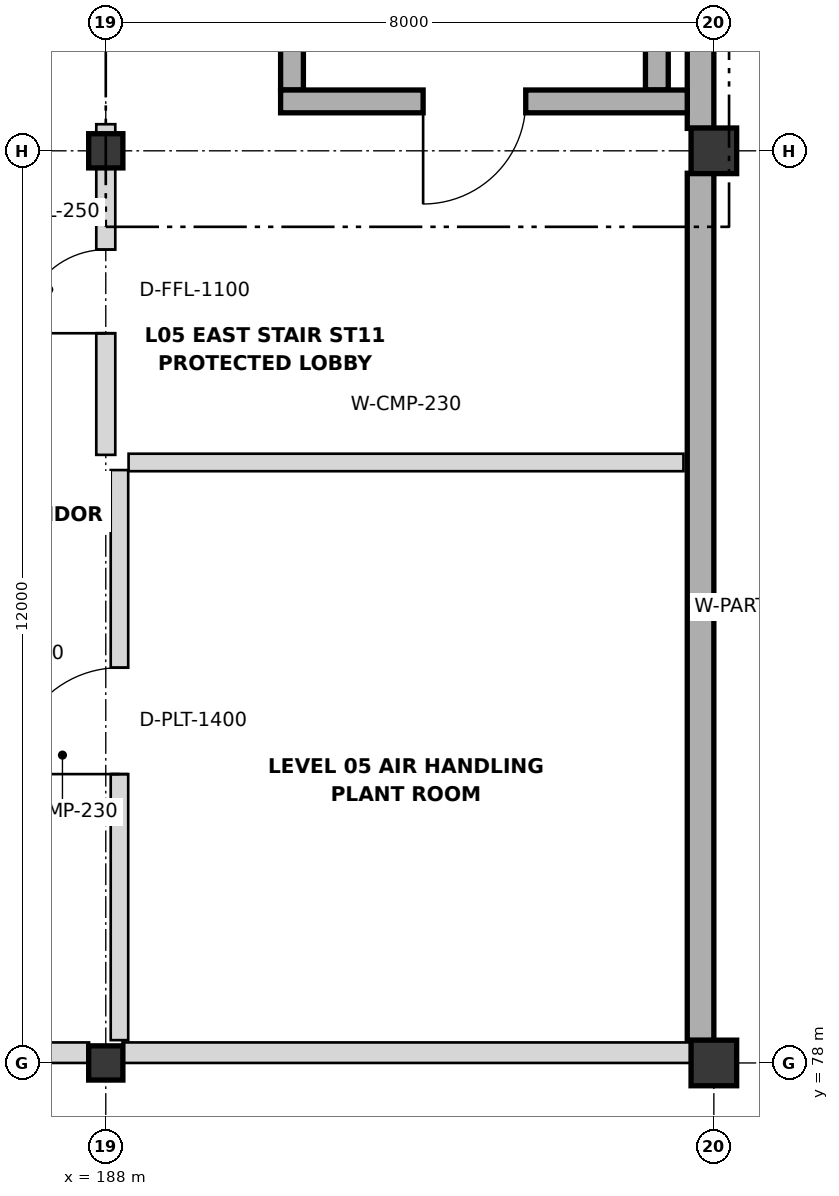
"""IFC4 building model, lengths in metres.
Left out: names, types, materials, properties, quantities, classifications, styles, units other than length and angle.
Written with IfcOpenShell. Run it as: python <this file> out.ifc"""

import sys

from ifc_helpers import new_model, si_unit, direction, frame, frame_2d, origin, origin_2d, place, context, subcontext, project, spatial, rectangle, extrude, element, fill, save


model = new_model("IFC4")
c1 = context("Model", 3, precision=1e-05, world=origin(), true_north=direction((0.0, 1.0)))
c2 = subcontext(c1, "Body", "Model", "MODEL_VIEW")
j1 = project(units=[si_unit("LENGTHUNIT", "METRE"), si_unit("PLANEANGLEUNIT", "RADIAN")], contexts=[c1])
p1 = place(None, origin())
s1 = spatial("IfcSite", under=j1, at=p1, CompositionType="ELEMENT")
p2 = place(p1, origin())
s2 = spatial("IfcBuilding", under=s1, at=p2, CompositionType="ELEMENT")
p3 = place(p2, frame((0.0, 0.0, 22.8)))
s3 = spatial("IfcBuildingStorey", under=s2, at=p3, CompositionType="ELEMENT", Elevation=22.8)
for number, where, z_axis, x_axis in (
    (1, (188.0, 78.0, 0.0), (0.0, 0.0, 1.0), (1.0, 0.0, 0.0)),
    (2, (188.0, 90.0, 0.0), (0.0, 0.0, 1.0), (1.0, 0.0, 0.0)),
):
    element("IfcColumn", number, at=place(p3, frame(where, z_axis=z_axis, x_axis=x_axis)), inside=s3, PredefinedType="COLUMN", context=c2, shape_type="SweptSolid", body=[
        extrude(rectangle(XDim=0.45, YDim=0.45, at=origin_2d()), origin(), (0.0, 0.0, 1.0), 4.2),
    ])
for number, where, z_axis, x_axis in (
    (3, (196.0, 78.0, 0.0), (0.0, 0.0, 1.0), (1.0, 0.0, 0.0)),
    (4, (196.0, 90.0, 0.0), (0.0, 0.0, 1.0), (1.0, 0.0, 0.0)),
):
    element("IfcColumn", number, at=place(p3, frame(where, z_axis=z_axis, x_axis=x_axis)), inside=s3, PredefinedType="COLUMN", context=c2, shape_type="SweptSolid", body=[
        extrude(rectangle(XDim=0.6, YDim=0.6, at=origin_2d()), origin(), (0.0, 0.0, 1.0), 4.2),
    ])
for number, where, z_axis, x_axis in (
    (5, (195.825, 89.705, 0.0), (0.0, 0.0, 1.0), (0.0, -1.0, 0.0)),
    (6, (195.825, 101.705, 0.0), (0.0, 0.0, 1.0), (0.0, -1.0, 0.0)),
):
    element("IfcWall", number, at=place(p3, frame(where, z_axis=z_axis, x_axis=x_axis)), inside=s3, PredefinedType="SOLIDWALL", context=c2, shape_type="SweptSolid", body=[
        extrude(rectangle(XDim=11.41, YDim=0.35, at=frame_2d((5.705, 0.0))), origin(), (0.0, 0.0, 1.0), 4.2),
    ])
p4 = place(p3, frame((187.78, 78.135, 0.0), z_axis=(0.0, 0.0, 1.0), x_axis=(-1.0, 0.0, 0.0)))
e7 = element("IfcWall", 7, at=p4, inside=s3, PredefinedType="SOLIDWALL", context=c2, shape_type="SweptSolid", body=[
    extrude(rectangle(XDim=9.56, YDim=0.27, at=frame_2d((4.78, 0.0))), origin(), (0.0, 0.0, 1.0), 3.188),
])
p5 = place(p4, frame((5.48, 0.0, 1.0)))
e8 = element("IfcOpeningElement", 8, at=p5, cuts=e7, PredefinedType="OPENING", context=c2, shape_type="SweptSolid", body=[
    extrude(rectangle(XDim=2.1, YDim=1.15, at=frame_2d((1.05, 0.575))), frame((0.0, 0.145, 0.0), z_axis=(0.0, -1.0, 0.0), x_axis=(1.0, 0.0, 0.0)), (0.0, 0.0, 1.0), 0.29),
])
p6 = place(p3, frame((195.705, 78.135, 0.0), z_axis=(0.0, 0.0, 1.0), x_axis=(-1.0, 0.0, 0.0)))
e9 = element("IfcWall", 9, at=p6, inside=s3, PredefinedType="SOLIDWALL", context=c2, shape_type="SweptSolid", body=[
    extrude(rectangle(XDim=7.485, YDim=0.27, at=frame_2d((3.743, 0.0))), origin(), (0.0, 0.0, 1.0), 3.188),
])
for number, where, z_axis, x_axis in (
    (10, (190.45, 90.8, 0.0), (0.0, 0.0, 1.0), (0.0, 1.0, 0.0)),
    (11, (195.25, 99.4, 0.0), (0.0, 0.0, 1.0), (0.0, -1.0, 0.0)),
):
    element("IfcWall", number, at=place(p3, frame(where, z_axis=z_axis, x_axis=x_axis)), inside=s3, PredefinedType="SHEAR", context=c2, shape_type="SweptSolid", body=[
        extrude(rectangle(XDim=8.6, YDim=0.3, at=frame_2d((4.3, 0.0))), origin(), (0.0, 0.0, 1.0), 3.95),
    ])
p7 = place(p3, frame((195.65, 90.65, 0.0), z_axis=(0.0, 0.0, 1.0), x_axis=(-1.0, 0.0, 0.0)))
e12 = element("IfcWall", 12, at=p7, inside=s3, PredefinedType="SHEAR", context=c2, shape_type="SweptSolid", body=[
    extrude(rectangle(XDim=5.35, YDim=0.3, at=frame_2d((2.675, 0.0))), origin(), (0.0, 0.0, 1.0), 3.95),
])
p8 = place(p7, frame((2.125, 0.0, 0.0)))
e13 = element("IfcOpeningElement", 13, at=p8, cuts=e12, PredefinedType="OPENING", context=c2, shape_type="SweptSolid", body=[
    extrude(rectangle(XDim=1.35, YDim=2.15, at=frame_2d((0.675, 1.075))), frame((0.0, 0.16, 0.0), z_axis=(0.0, -1.0, 0.0), x_axis=(1.0, 0.0, 0.0)), (0.0, 0.0, 1.0), 0.32),
])
p9 = place(p3, frame((188.0, 86.0, 0.0), z_axis=(0.0, 0.0, 1.0), x_axis=(0.0, 1.0, 0.0)))
e14 = element("IfcWall", 14, at=p9, inside=s3, PredefinedType="PARTITIONING", context=c2, shape_type="SweptSolid", body=[
    extrude(rectangle(XDim=4.35, YDim=0.25, at=frame_2d((2.175, 0.0))), origin(), (0.0, 0.0, 1.0), 3.188),
])
p10 = place(p9, frame((1.6, 0.0, 0.0)))
e15 = element("IfcOpeningElement", 15, at=p10, cuts=e14, PredefinedType="OPENING", context=c2, shape_type="SweptSolid", body=[
    extrude(rectangle(XDim=1.1, YDim=2.15, at=frame_2d((0.55, 1.075))), frame((0.0, 0.135, 0.0), z_axis=(0.0, -1.0, 0.0), x_axis=(1.0, 0.0, 0.0)), (0.0, 0.0, 1.0), 0.27),
])
p11 = place(p3, frame((188.18, 78.3, 0.0), z_axis=(0.0, 0.0, 1.0), x_axis=(0.0, 1.0, 0.0)))
e16 = element("IfcWall", 16, at=p11, inside=s3, PredefinedType="PARTITIONING", context=c2, shape_type="SweptSolid", body=[
    extrude(rectangle(XDim=7.5, YDim=0.23, at=frame_2d((3.75, 0.0))), origin(), (0.0, 0.0, 1.0), 3.188),
])
p12 = place(p11, frame((3.5, 0.0, 0.0)))
e17 = element("IfcOpeningElement", 17, at=p12, cuts=e16, PredefinedType="OPENING", context=c2, shape_type="SweptSolid", body=[
    extrude(rectangle(XDim=1.4, YDim=2.2, at=frame_2d((0.7, 1.1))), frame((0.0, 0.125, 0.0), z_axis=(0.0, -1.0, 0.0), x_axis=(1.0, 0.0, 0.0)), (0.0, 0.0, 1.0), 0.25),
])
p13 = place(p3, frame((188.3, 85.9, 0.0), z_axis=(0.0, 0.0, 1.0), x_axis=(1.0, 0.0, 0.0)))
e18 = element("IfcWall", 18, at=p13, inside=s3, PredefinedType="PARTITIONING", context=c2, shape_type="SweptSolid", body=[
    extrude(rectangle(XDim=7.3, YDim=0.23, at=frame_2d((3.65, 0.0))), origin(), (0.0, 0.0, 1.0), 3.188),
])
p14 = place(p8, origin())
e19 = element("IfcDoor", 19, at=p14, inside=s3, OperationType="SINGLE_SWING_RIGHT", PredefinedType="DOOR", context=c2, shape_type="SweptSolid", body=[
    extrude(rectangle(XDim=1.35, YDim=2.15, at=frame_2d((0.675, 1.075))), frame((0.0, 0.025, 0.0), z_axis=(0.0, -1.0, 0.0), x_axis=(1.0, 0.0, 0.0)), (0.0, 0.0, 1.0), 0.05),
])
fill(e13, e19)
p15 = place(p10, origin())
e20 = element("IfcDoor", 20, at=p15, inside=s3, OperationType="SINGLE_SWING_LEFT", PredefinedType="DOOR", context=c2, shape_type="SweptSolid", body=[
    extrude(rectangle(XDim=1.1, YDim=2.15, at=frame_2d((0.55, 1.075))), frame((0.0, 0.025, 0.0), z_axis=(0.0, -1.0, 0.0), x_axis=(1.0, 0.0, 0.0)), (0.0, 0.0, 1.0), 0.05),
])
fill(e15, e20)
p16 = place(p12, origin())
e21 = element("IfcDoor", 21, at=p16, inside=s3, OperationType="SINGLE_SWING_LEFT", PredefinedType="DOOR", context=c2, shape_type="SweptSolid", body=[
    extrude(rectangle(XDim=1.4, YDim=2.2, at=frame_2d((0.7, 1.1))), frame((0.0, 0.025, 0.0), z_axis=(0.0, -1.0, 0.0), x_axis=(1.0, 0.0, 0.0)), (0.0, 0.0, 1.0), 0.05),
])
fill(e17, e21)
save(model, sys.argv[1])
